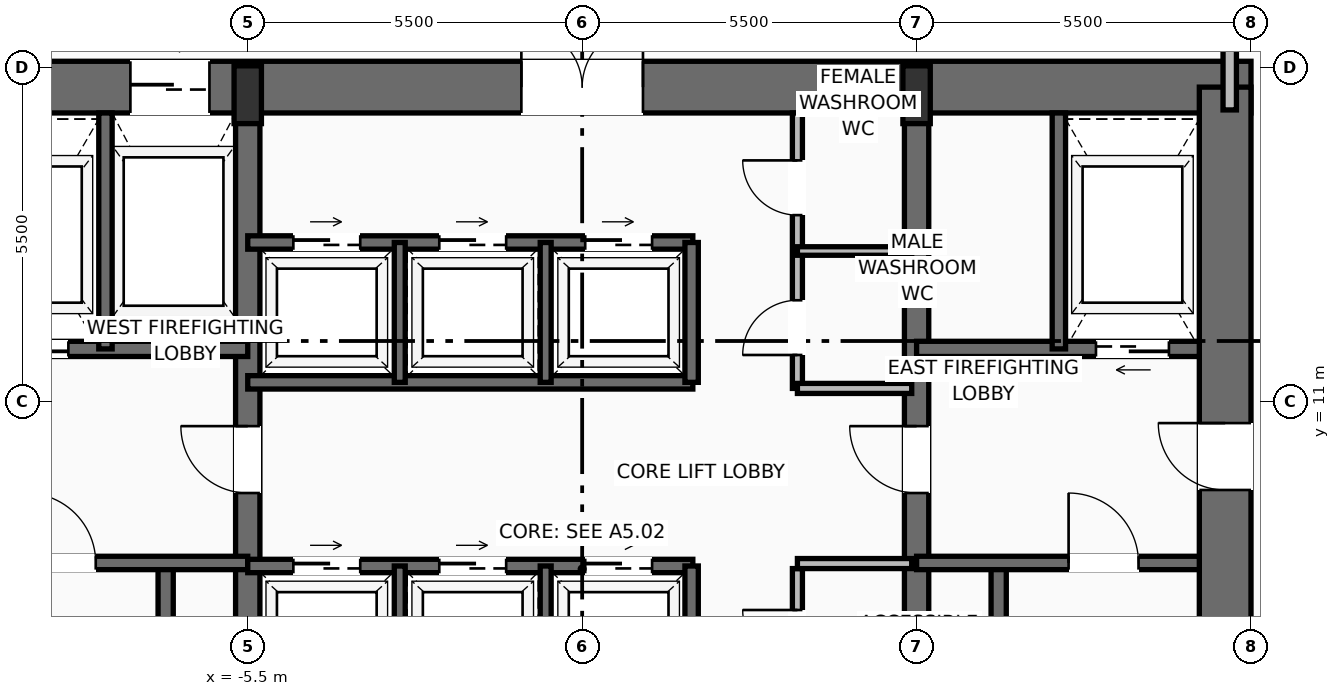
"""IFC4 building model, lengths in metres.
Left out: names, types, materials, properties, quantities, classifications, styles, units other than length and angle.
Written with IfcOpenShell. Run it as: python <this file> out.ifc"""

import sys

from ifc_helpers import new_model, si_unit, direction, frame, frame_2d, origin, origin_2d, place, context, subcontext, project, spatial, rectangle, extrude, source, transform, mapped, element, fill, save


model = new_model("IFC4")
c1 = context("Model", 3, precision=1e-05, world=origin(), true_north=direction((0.0, 1.0)))
c2 = subcontext(c1, "Body", "Model", "MODEL_VIEW")
j1 = project(units=[si_unit("LENGTHUNIT", "METRE"), si_unit("PLANEANGLEUNIT", "RADIAN")], contexts=[c1])
p1 = place(None, origin())
s1 = spatial("IfcSite", under=j1, at=p1, CompositionType="ELEMENT")
p2 = place(p1, origin())
s2 = spatial("IfcBuilding", under=s1, at=p2, CompositionType="ELEMENT")
p3 = place(p2, origin())
s3 = spatial("IfcBuildingStorey", under=s2, at=p3, CompositionType="ELEMENT", Elevation=0.0)
p4 = place(p3, frame((-11.0, 16.175, 0.0), z_axis=(0.0, 0.0, 1.0), x_axis=(1.0, 0.0, 0.0)))
e1 = element("IfcWall", 1, at=p4, inside=s3, PredefinedType="SHEAR", context=c2, shape_type="SweptSolid", body=[
    extrude(rectangle(XDim=22.0, YDim=0.85, at=frame_2d((11.0, 0.0))), origin(), (0.0, 0.0, 1.0), 5.15),
])
p5 = place(p4, frame((3.57, 0.0, 0.0)))
e2 = element("IfcOpeningElement", 2, at=p5, cuts=e1, PredefinedType="OPENING", context=c2, shape_type="SweptSolid", body=[
    extrude(rectangle(XDim=1.3, YDim=2.3, at=frame_2d((0.65, 1.15))), frame((0.0, 0.435, 0.0), z_axis=(0.0, -1.0, 0.0), x_axis=(1.0, 0.0, 0.0)), (0.0, 0.0, 1.0), 0.87),
])
p6 = place(p4, frame((10.0, 0.0, 0.0)))
e3 = element("IfcOpeningElement", 3, at=p6, cuts=e1, PredefinedType="OPENING", context=c2, shape_type="SweptSolid", body=[
    extrude(rectangle(XDim=2.0, YDim=2.4, at=frame_2d((1.0, 1.2))), frame((0.0, 0.435, 0.0), z_axis=(0.0, -1.0, 0.0), x_axis=(1.0, 0.0, 0.0)), (0.0, 0.0, 1.0), 0.87),
])
p7 = place(p3, frame((10.575, 0.425, 0.0), z_axis=(0.0, 0.0, 1.0), x_axis=(0.0, 1.0, 0.0)))
e4 = element("IfcWall", 4, at=p7, inside=s3, PredefinedType="SHEAR", context=c2, shape_type="SweptSolid", body=[
    extrude(rectangle(XDim=15.75, YDim=0.85, at=frame_2d((7.875, 0.0))), origin(), (0.0, 0.0, 1.0), 5.15),
])
p8 = place(p7, frame((9.125, 0.0, 0.0)))
e5 = element("IfcOpeningElement", 5, at=p8, cuts=e4, PredefinedType="OPENING", context=c2, shape_type="SweptSolid", body=[
    extrude(rectangle(XDim=1.1, YDim=2.2, at=frame_2d((0.55, 1.1))), frame((0.0, 0.435, 0.0), z_axis=(0.0, -1.0, 0.0), x_axis=(1.0, 0.0, 0.0)), (0.0, 0.0, 1.0), 0.87),
])
p9 = place(p3, frame((-5.5, 0.425, 0.0), z_axis=(0.0, 0.0, 1.0), x_axis=(0.0, 1.0, 0.0)))
e6 = element("IfcWall", 6, at=p9, inside=s3, PredefinedType="SHEAR", context=c2, shape_type="SweptSolid", body=[
    extrude(rectangle(XDim=15.75, YDim=0.4, at=frame_2d((7.875, 0.0))), origin(), (0.0, 0.0, 1.0), 5.15),
])
p10 = place(p9, frame((9.075, 0.0, 0.0)))
e7 = element("IfcOpeningElement", 7, at=p10, cuts=e6, PredefinedType="OPENING", context=c2, shape_type="SweptSolid", body=[
    extrude(rectangle(XDim=1.1, YDim=2.2, at=frame_2d((0.55, 1.1))), frame((0.0, 0.21, 0.0), z_axis=(0.0, -1.0, 0.0), x_axis=(1.0, 0.0, 0.0)), (0.0, 0.0, 1.0), 0.42),
])
p11 = place(p3, frame((5.5, 0.425, 0.0), z_axis=(0.0, 0.0, 1.0), x_axis=(0.0, 1.0, 0.0)))
e8 = element("IfcWall", 8, at=p11, inside=s3, PredefinedType="SHEAR", context=c2, shape_type="SweptSolid", body=[
    extrude(rectangle(XDim=15.75, YDim=0.4, at=frame_2d((7.875, 0.0))), origin(), (0.0, 0.0, 1.0), 5.15),
])
p12 = place(p11, frame((9.075, 0.0, 0.0)))
e9 = element("IfcOpeningElement", 9, at=p12, cuts=e8, PredefinedType="OPENING", context=c2, shape_type="SweptSolid", body=[
    extrude(rectangle(XDim=1.1, YDim=2.2, at=frame_2d((0.55, 1.1))), frame((0.0, 0.21, 0.0), z_axis=(0.0, -1.0, 0.0), x_axis=(1.0, 0.0, 0.0)), (0.0, 0.0, 1.0), 0.42),
])
m1 = source(origin(), c2, "Body", "SweptSolid", [
    extrude(rectangle(XDim=0.45, YDim=0.95, at=origin_2d()), origin(), (0.0, 0.0, 1.0), 5.5),
])
for number, where, z_axis, x_axis in (
    (10, (-5.5, 16.05, 0.0), (0.0, 0.0, 1.0), (1.0, 0.0, 0.0)),
    (11, (5.5, 16.05, 0.0), (0.0, 0.0, 1.0), (1.0, 0.0, 0.0)),
):
    element("IfcColumn", number, at=place(p3, frame(where, z_axis=z_axis, x_axis=x_axis)), inside=s3, PredefinedType="PILASTER", context=c2, shape_type="MappedRepresentation", body=[
        mapped(m1, transform((0.0, 0.0, 0.0), scale=1.0)),
    ])
p13 = place(p3, frame((-6.85, 0.85, 0.0), z_axis=(0.0, 0.0, 1.0), x_axis=(0.0, 1.0, 0.0)))
e12 = element("IfcWall", 12, at=p13, inside=s3, PredefinedType="SOLIDWALL", context=c2, shape_type="SweptSolid", body=[
    extrude(rectangle(XDim=7.5, YDim=0.25, at=frame_2d((3.75, 0.0))), origin(), (0.0, 0.0, 1.0), 5.15),
])
p14 = place(p3, frame((-10.15, 8.35, 0.0), z_axis=(0.0, 0.0, 1.0), x_axis=(1.0, 0.0, 0.0)))
e13 = element("IfcWall", 13, at=p14, inside=s3, PredefinedType="SOLIDWALL", context=c2, shape_type="SweptSolid", body=[
    extrude(rectangle(XDim=4.65, YDim=0.22, at=frame_2d((2.325, 0.0))), origin(), (0.0, 0.0, 1.0), 5.15),
])
p15 = place(p14, frame((1.0, 0.0, 0.0)))
e14 = element("IfcOpeningElement", 14, at=p15, cuts=e13, PredefinedType="OPENING", context=c2, shape_type="SweptSolid", body=[
    extrude(rectangle(XDim=1.15, YDim=2.2, at=frame_2d((0.575, 1.1))), frame((0.0, 0.12, 0.0), z_axis=(0.0, -1.0, 0.0), x_axis=(1.0, 0.0, 0.0)), (0.0, 0.0, 1.0), 0.24),
])
p16 = place(p3, frame((-5.5, 11.87, 0.0), z_axis=(0.0, 0.0, 1.0), x_axis=(-1.0, 0.0, 0.0)))
e15 = element("IfcWall", 15, at=p16, inside=s3, PredefinedType="SOLIDWALL", context=c2, shape_type="SweptSolid", body=[
    extrude(rectangle(XDim=4.65, YDim=0.25, at=frame_2d((2.325, 0.0))), origin(), (0.0, 0.0, 1.0), 5.15),
])
p17 = place(p16, frame((2.95, 0.0, 0.0)))
e16 = element("IfcOpeningElement", 16, at=p17, cuts=e15, PredefinedType="OPENING", context=c2, shape_type="SweptSolid", body=[
    extrude(rectangle(XDim=1.2, YDim=2.25, at=frame_2d((0.6, 1.125))), frame((0.0, 0.135, 0.0), z_axis=(0.0, -1.0, 0.0), x_axis=(1.0, 0.0, 0.0)), (0.0, 0.0, 1.0), 0.27),
])
p18 = place(p3, frame((-7.84, 11.87, 0.0), z_axis=(0.0, 0.0, 1.0), x_axis=(0.0, 1.0, 0.0)))
e17 = element("IfcWall", 17, at=p18, inside=s3, PredefinedType="SOLIDWALL", context=c2, shape_type="SweptSolid", body=[
    extrude(rectangle(XDim=3.88, YDim=0.22, at=frame_2d((1.94, 0.0))), origin(), (0.0, 0.0, 1.0), 5.15),
])
p19 = place(p3, frame((6.85, 0.85, 0.0), z_axis=(0.0, 0.0, 1.0), x_axis=(0.0, 1.0, 0.0)))
e18 = element("IfcWall", 18, at=p19, inside=s3, PredefinedType="SOLIDWALL", context=c2, shape_type="SweptSolid", body=[
    extrude(rectangle(XDim=7.5, YDim=0.25, at=frame_2d((3.75, 0.0))), origin(), (0.0, 0.0, 1.0), 5.15),
])
p20 = place(p3, frame((5.5, 8.35, 0.0), z_axis=(0.0, 0.0, 1.0), x_axis=(1.0, 0.0, 0.0)))
e19 = element("IfcWall", 19, at=p20, inside=s3, PredefinedType="SOLIDWALL", context=c2, shape_type="SweptSolid", body=[
    extrude(rectangle(XDim=4.65, YDim=0.22, at=frame_2d((2.325, 0.0))), origin(), (0.0, 0.0, 1.0), 5.15),
])
p21 = place(p20, frame((2.5, 0.0, 0.0)))
e20 = element("IfcOpeningElement", 20, at=p21, cuts=e19, PredefinedType="OPENING", context=c2, shape_type="SweptSolid", body=[
    extrude(rectangle(XDim=1.15, YDim=2.2, at=frame_2d((0.575, 1.1))), frame((0.0, 0.12, 0.0), z_axis=(0.0, -1.0, 0.0), x_axis=(1.0, 0.0, 0.0)), (0.0, 0.0, 1.0), 0.24),
])
p22 = place(p3, frame((10.15, 11.87, 0.0), z_axis=(0.0, 0.0, 1.0), x_axis=(-1.0, 0.0, 0.0)))
e21 = element("IfcWall", 21, at=p22, inside=s3, PredefinedType="SOLIDWALL", context=c2, shape_type="SweptSolid", body=[
    extrude(rectangle(XDim=4.65, YDim=0.25, at=frame_2d((2.325, 0.0))), origin(), (0.0, 0.0, 1.0), 5.15),
])
p23 = place(p22, frame((0.5, 0.0, 0.0)))
e22 = element("IfcOpeningElement", 22, at=p23, cuts=e21, PredefinedType="OPENING", context=c2, shape_type="SweptSolid", body=[
    extrude(rectangle(XDim=1.2, YDim=2.25, at=frame_2d((0.6, 1.125))), frame((0.0, 0.135, 0.0), z_axis=(0.0, -1.0, 0.0), x_axis=(1.0, 0.0, 0.0)), (0.0, 0.0, 1.0), 0.27),
])
p24 = place(p3, frame((7.84, 11.87, 0.0), z_axis=(0.0, 0.0, 1.0), x_axis=(0.0, 1.0, 0.0)))
e23 = element("IfcWall", 23, at=p24, inside=s3, PredefinedType="SOLIDWALL", context=c2, shape_type="SweptSolid", body=[
    extrude(rectangle(XDim=3.88, YDim=0.22, at=frame_2d((1.94, 0.0))), origin(), (0.0, 0.0, 1.0), 5.15),
])
p25 = place(p3, frame((3.54, 5.383, 0.0), z_axis=(0.0, 0.0, 1.0), x_axis=(0.0, 1.0, 0.0)))
e24 = element("IfcWall", 24, at=p25, inside=s3, PredefinedType="PARTITIONING", context=c2, shape_type="SweptSolid", body=[
    extrude(rectangle(XDim=2.875, YDim=0.165, at=frame_2d((1.438, 0.0))), origin(), (0.0, 0.0, 1.0), 5.142),
])
p26 = place(p25, frame((1.294, 0.0, 0.0)))
e25 = element("IfcOpeningElement", 25, at=p26, cuts=e24, PredefinedType="OPENING", context=c2, shape_type="SweptSolid", body=[
    extrude(rectangle(XDim=0.9, YDim=2.1, at=frame_2d((0.45, 1.05))), frame((0.0, 0.093, 0.0), z_axis=(0.0, -1.0, 0.0), x_axis=(1.0, 0.0, 0.0)), (0.0, 0.0, 1.0), 0.185),
])
p27 = place(p3, frame((3.54, 8.34, 0.0), z_axis=(0.0, 0.0, 1.0), x_axis=(1.0, 0.0, 0.0)))
e26 = element("IfcWall", 26, at=p27, inside=s3, PredefinedType="PARTITIONING", context=c2, shape_type="SweptSolid", body=[
    extrude(rectangle(XDim=1.88, YDim=0.165, at=frame_2d((0.94, 0.0))), origin(), (0.0, 0.0, 1.0), 5.142),
])
p28 = place(p3, frame((-5.5, 8.3, 0.0), z_axis=(0.0, 0.0, 1.0), x_axis=(1.0, 0.0, 0.0)))
e27 = element("IfcWall", 27, at=p28, inside=s3, PredefinedType="SOLIDWALL", context=c2, shape_type="SweptSolid", body=[
    extrude(rectangle(XDim=7.32, YDim=0.22, at=frame_2d((3.66, 0.0))), origin(), (0.0, 0.0, 1.0), 5.15),
])
p29 = place(p28, frame((0.75, 0.0, 0.0)))
e28 = element("IfcOpeningElement", 28, at=p29, cuts=e27, PredefinedType="OPENING", context=c2, shape_type="SweptSolid", body=[
    extrude(rectangle(XDim=1.1, YDim=2.2, at=frame_2d((0.55, 1.1))), frame((0.0, 0.12, 0.0), z_axis=(0.0, -1.0, 0.0), x_axis=(1.0, 0.0, 0.0)), (0.0, 0.0, 1.0), 0.24),
])
p30 = place(p28, frame((3.15, 0.0, 0.0)))
e29 = element("IfcOpeningElement", 29, at=p30, cuts=e27, PredefinedType="OPENING", context=c2, shape_type="SweptSolid", body=[
    extrude(rectangle(XDim=1.1, YDim=2.2, at=frame_2d((0.55, 1.1))), frame((0.0, 0.12, 0.0), z_axis=(0.0, -1.0, 0.0), x_axis=(1.0, 0.0, 0.0)), (0.0, 0.0, 1.0), 0.24),
])
p31 = place(p28, frame((5.55, 0.0, 0.0)))
e30 = element("IfcOpeningElement", 30, at=p31, cuts=e27, PredefinedType="OPENING", context=c2, shape_type="SweptSolid", body=[
    extrude(rectangle(XDim=1.1, YDim=2.2, at=frame_2d((0.55, 1.1))), frame((0.0, 0.12, 0.0), z_axis=(0.0, -1.0, 0.0), x_axis=(1.0, 0.0, 0.0)), (0.0, 0.0, 1.0), 0.24),
])
p32 = place(p3, frame((1.8, 6.0, 0.0), z_axis=(0.0, 0.0, 1.0), x_axis=(0.0, 1.0, 0.0)))
e31 = element("IfcWall", 31, at=p32, inside=s3, PredefinedType="SOLIDWALL", context=c2, shape_type="SweptSolid", body=[
    extrude(rectangle(XDim=2.3, YDim=0.22, at=frame_2d((1.15, 0.0))), origin(), (0.0, 0.0, 1.0), 5.15),
])
for number, where, z_axis, x_axis in (
    (32, (-3.0, 6.0, 0.0), (0.0, 0.0, 1.0), (0.0, 1.0, 0.0)),
    (33, (-0.6, 6.0, 0.0), (0.0, 0.0, 1.0), (0.0, 1.0, 0.0)),
):
    element("IfcWall", number, at=place(p3, frame(where, z_axis=z_axis, x_axis=x_axis)), inside=s3, PredefinedType="SOLIDWALL", context=c2, shape_type="SweptSolid", body=[
        extrude(rectangle(XDim=2.3, YDim=0.18, at=frame_2d((1.15, 0.0))), origin(), (0.0, 0.0, 1.0), 5.15),
    ])
p33 = place(p3, frame((-5.5, 11.32, 0.0), z_axis=(0.0, 0.0, 1.0), x_axis=(1.0, 0.0, 0.0)))
e34 = element("IfcWall", 34, at=p33, inside=s3, PredefinedType="SOLIDWALL", context=c2, shape_type="SweptSolid", body=[
    extrude(rectangle(XDim=7.32, YDim=0.22, at=frame_2d((3.66, 0.0))), origin(), (0.0, 0.0, 1.0), 5.15),
])
p34 = place(p3, frame((-5.5, 13.62, 0.0), z_axis=(0.0, 0.0, 1.0), x_axis=(1.0, 0.0, 0.0)))
e35 = element("IfcWall", 35, at=p34, inside=s3, PredefinedType="SOLIDWALL", context=c2, shape_type="SweptSolid", body=[
    extrude(rectangle(XDim=7.32, YDim=0.22, at=frame_2d((3.66, 0.0))), origin(), (0.0, 0.0, 1.0), 5.15),
])
p35 = place(p34, frame((0.75, 0.0, 0.0)))
e36 = element("IfcOpeningElement", 36, at=p35, cuts=e35, PredefinedType="OPENING", context=c2, shape_type="SweptSolid", body=[
    extrude(rectangle(XDim=1.1, YDim=2.2, at=frame_2d((0.55, 1.1))), frame((0.0, 0.12, 0.0), z_axis=(0.0, -1.0, 0.0), x_axis=(1.0, 0.0, 0.0)), (0.0, 0.0, 1.0), 0.24),
])
p36 = place(p34, frame((3.15, 0.0, 0.0)))
e37 = element("IfcOpeningElement", 37, at=p36, cuts=e35, PredefinedType="OPENING", context=c2, shape_type="SweptSolid", body=[
    extrude(rectangle(XDim=1.1, YDim=2.2, at=frame_2d((0.55, 1.1))), frame((0.0, 0.12, 0.0), z_axis=(0.0, -1.0, 0.0), x_axis=(1.0, 0.0, 0.0)), (0.0, 0.0, 1.0), 0.24),
])
p37 = place(p34, frame((5.55, 0.0, 0.0)))
e38 = element("IfcOpeningElement", 38, at=p37, cuts=e35, PredefinedType="OPENING", context=c2, shape_type="SweptSolid", body=[
    extrude(rectangle(XDim=1.1, YDim=2.2, at=frame_2d((0.55, 1.1))), frame((0.0, 0.12, 0.0), z_axis=(0.0, -1.0, 0.0), x_axis=(1.0, 0.0, 0.0)), (0.0, 0.0, 1.0), 0.24),
])
p38 = place(p3, frame((1.8, 11.32, 0.0), z_axis=(0.0, 0.0, 1.0), x_axis=(0.0, 1.0, 0.0)))
e39 = element("IfcWall", 39, at=p38, inside=s3, PredefinedType="SOLIDWALL", context=c2, shape_type="SweptSolid", body=[
    extrude(rectangle(XDim=2.3, YDim=0.22, at=frame_2d((1.15, 0.0))), origin(), (0.0, 0.0, 1.0), 5.15),
])
for number, where, z_axis, x_axis in (
    (40, (-3.0, 11.32, 0.0), (0.0, 0.0, 1.0), (0.0, 1.0, 0.0)),
    (41, (-0.6, 11.32, 0.0), (0.0, 0.0, 1.0), (0.0, 1.0, 0.0)),
):
    element("IfcWall", number, at=place(p3, frame(where, z_axis=z_axis, x_axis=x_axis)), inside=s3, PredefinedType="SOLIDWALL", context=c2, shape_type="SweptSolid", body=[
        extrude(rectangle(XDim=2.3, YDim=0.18, at=frame_2d((1.15, 0.0))), origin(), (0.0, 0.0, 1.0), 5.15),
    ])
p39 = place(p3, frame((3.54, 11.22, 0.0), z_axis=(0.0, 0.0, 1.0), x_axis=(0.0, 1.0, 0.0)))
e42 = element("IfcWall", 42, at=p39, inside=s3, PredefinedType="PARTITIONING", context=c2, shape_type="SweptSolid", body=[
    extrude(rectangle(XDim=4.53, YDim=0.165, at=frame_2d((2.265, 0.0))), origin(), (0.0, 0.0, 1.0), 5.142),
])
p40 = place(p39, frame((0.55, 0.0, 0.0)))
e43 = element("IfcOpeningElement", 43, at=p40, cuts=e42, PredefinedType="OPENING", context=c2, shape_type="SweptSolid", body=[
    extrude(rectangle(XDim=0.9, YDim=2.1, at=frame_2d((0.45, 1.05))), frame((0.0, 0.093, 0.0), z_axis=(0.0, -1.0, 0.0), x_axis=(1.0, 0.0, 0.0)), (0.0, 0.0, 1.0), 0.185),
])
p41 = place(p39, frame((2.85, 0.0, 0.0)))
e44 = element("IfcOpeningElement", 44, at=p41, cuts=e42, PredefinedType="OPENING", context=c2, shape_type="SweptSolid", body=[
    extrude(rectangle(XDim=0.9, YDim=2.1, at=frame_2d((0.45, 1.05))), frame((0.0, 0.093, 0.0), z_axis=(0.0, -1.0, 0.0), x_axis=(1.0, 0.0, 0.0)), (0.0, 0.0, 1.0), 0.185),
])
p42 = place(p3, frame((3.54, 11.22, 0.0), z_axis=(0.0, 0.0, 1.0), x_axis=(1.0, 0.0, 0.0)))
e45 = element("IfcWall", 45, at=p42, inside=s3, PredefinedType="PARTITIONING", context=c2, shape_type="SweptSolid", body=[
    extrude(rectangle(XDim=1.88, YDim=0.165, at=frame_2d((0.94, 0.0))), origin(), (0.0, 0.0, 1.0), 5.142),
])
p43 = place(p3, frame((3.54, 13.48, 0.0), z_axis=(0.0, 0.0, 1.0), x_axis=(1.0, 0.0, 0.0)))
e46 = element("IfcWall", 46, at=p43, inside=s3, PredefinedType="PARTITIONING", context=c2, shape_type="SweptSolid", body=[
    extrude(rectangle(XDim=1.88, YDim=0.14, at=frame_2d((0.94, 0.0))), origin(), (0.0, 0.0, 1.0), 5.142),
])
p44 = place(p3, frame((10.65, 15.8, 0.0), z_axis=(0.0, 0.0, 1.0), x_axis=(0.0, 1.0, 0.0)))
e47 = element("IfcWall", 47, at=p44, inside=s3, PredefinedType="SOLIDWALL", context=c2, shape_type="SweptSolid", body=[
    extrude(rectangle(XDim=1.85, YDim=0.22, at=frame_2d((0.925, 0.0))), origin(), (0.0, 0.0, 1.0), 4.102),
])
m2 = source(origin(), c2, "Body", "SweptSolid", [
    extrude(rectangle(XDim=1.15, YDim=2.2, at=frame_2d((0.575, 1.1))), frame((0.0, 0.025, 0.0), z_axis=(0.0, -1.0, 0.0), x_axis=(1.0, 0.0, 0.0)), (0.0, 0.0, 1.0), 0.05),
])
p45 = place(p15, origin())
e48 = element("IfcDoor", 48, at=p45, inside=s3, OperationType="SINGLE_SWING_LEFT", PredefinedType="DOOR", context=c2, shape_type="MappedRepresentation", body=[
    mapped(m2, transform((0.0, 0.0, 0.0), scale=1.0)),
])
fill(e14, e48)
m3 = source(origin(), c2, "Body", "SweptSolid", [
    extrude(rectangle(XDim=1.1, YDim=2.2, at=frame_2d((0.55, 1.1))), frame((0.0, 0.025, 0.0), z_axis=(0.0, -1.0, 0.0), x_axis=(1.0, 0.0, 0.0)), (0.0, 0.0, 1.0), 0.05),
])
p46 = place(p10, origin())
e49 = element("IfcDoor", 49, at=p46, inside=s3, OperationType="SINGLE_SWING_RIGHT", PredefinedType="DOOR", context=c2, shape_type="MappedRepresentation", body=[
    mapped(m3, transform((0.0, 0.0, 0.0), scale=1.0)),
])
fill(e7, e49)
m4 = source(origin(), c2, "Body", "SweptSolid", [
    extrude(rectangle(XDim=1.2, YDim=2.25, at=frame_2d((0.6, 1.125))), frame((0.0, 0.025, 0.0), z_axis=(0.0, -1.0, 0.0), x_axis=(1.0, 0.0, 0.0)), (0.0, 0.0, 1.0), 0.05),
])
p47 = place(p17, origin())
e50 = element("IfcDoor", 50, at=p47, inside=s3, OperationType="SLIDING_TO_LEFT", PredefinedType="DOOR", context=c2, shape_type="MappedRepresentation", body=[
    mapped(m4, transform((0.0, 0.0, 0.0), scale=1.0)),
])
fill(e16, e50)
m5 = source(origin(), c2, "Body", "SweptSolid", [
    extrude(rectangle(XDim=1.3, YDim=2.3, at=frame_2d((0.65, 1.15))), frame((0.0, 0.025, 0.0), z_axis=(0.0, -1.0, 0.0), x_axis=(1.0, 0.0, 0.0)), (0.0, 0.0, 1.0), 0.05),
])
p48 = place(p5, origin())
e51 = element("IfcDoor", 51, at=p48, inside=s3, OperationType="SLIDING_TO_RIGHT", PredefinedType="DOOR", context=c2, shape_type="MappedRepresentation", body=[
    mapped(m5, transform((0.0, 0.0, 0.0), scale=1.0)),
])
fill(e2, e51)
p49 = place(p21, origin())
e52 = element("IfcDoor", 52, at=p49, inside=s3, OperationType="SINGLE_SWING_LEFT", PredefinedType="DOOR", context=c2, shape_type="MappedRepresentation", body=[
    mapped(m2, transform((0.0, 0.0, 0.0), scale=1.0)),
])
fill(e20, e52)
p50 = place(p12, origin())
e53 = element("IfcDoor", 53, at=p50, inside=s3, OperationType="SINGLE_SWING_RIGHT", PredefinedType="DOOR", context=c2, shape_type="MappedRepresentation", body=[
    mapped(m3, transform((0.0, 0.0, 0.0), scale=1.0)),
])
fill(e9, e53)
p51 = place(p8, origin())
e54 = element("IfcDoor", 54, at=p51, inside=s3, OperationType="SINGLE_SWING_RIGHT", PredefinedType="DOOR", context=c2, shape_type="MappedRepresentation", body=[
    mapped(m3, transform((0.0, 0.0, 0.0), scale=1.0)),
])
fill(e5, e54)
p52 = place(p23, origin())
e55 = element("IfcDoor", 55, at=p52, inside=s3, OperationType="SLIDING_TO_RIGHT", PredefinedType="DOOR", context=c2, shape_type="MappedRepresentation", body=[
    mapped(m4, transform((0.0, 0.0, 0.0), scale=1.0)),
])
fill(e22, e55)
m6 = source(origin(), c2, "Body", "SweptSolid", [
    extrude(rectangle(XDim=2.0, YDim=2.4, at=frame_2d((1.0, 1.2))), frame((0.0, 0.025, 0.0), z_axis=(0.0, -1.0, 0.0), x_axis=(1.0, 0.0, 0.0)), (0.0, 0.0, 1.0), 0.05),
])
p53 = place(p6, origin())
e56 = element("IfcDoor", 56, at=p53, inside=s3, OperationType="DOUBLE_DOOR_SINGLE_SWING", PredefinedType="DOOR", context=c2, shape_type="MappedRepresentation", body=[
    mapped(m6, transform((0.0, 0.0, 0.0), scale=1.0)),
])
fill(e3, e56)
m7 = source(origin(), c2, "Body", "SweptSolid", [
    extrude(rectangle(XDim=0.9, YDim=2.1, at=frame_2d((0.45, 1.05))), frame((0.0, 0.025, 0.0), z_axis=(0.0, -1.0, 0.0), x_axis=(1.0, 0.0, 0.0)), (0.0, 0.0, 1.0), 0.05),
])
p54 = place(p26, origin())
e57 = element("IfcDoor", 57, at=p54, inside=s3, OperationType="SINGLE_SWING_RIGHT", PredefinedType="DOOR", context=c2, shape_type="MappedRepresentation", body=[
    mapped(m7, transform((0.0, 0.0, 0.0), scale=1.0)),
])
fill(e25, e57)
m8 = source(origin(), c2, "Body", "SweptSolid", [
    extrude(rectangle(XDim=1.1, YDim=2.2, at=frame_2d((0.55, 1.1))), frame((0.0, 0.025, 0.0), z_axis=(0.0, -1.0, 0.0), x_axis=(1.0, 0.0, 0.0)), (0.0, 0.0, 1.0), 0.05),
])
p55 = place(p29, origin())
e58 = element("IfcDoor", 58, at=p55, inside=s3, OperationType="SLIDING_TO_LEFT", PredefinedType="DOOR", context=c2, shape_type="MappedRepresentation", body=[
    mapped(m8, transform((0.0, 0.0, 0.0), scale=1.0)),
])
fill(e28, e58)
p56 = place(p30, origin())
e59 = element("IfcDoor", 59, at=p56, inside=s3, OperationType="SLIDING_TO_LEFT", PredefinedType="DOOR", context=c2, shape_type="MappedRepresentation", body=[
    mapped(m8, transform((0.0, 0.0, 0.0), scale=1.0)),
])
fill(e29, e59)
p57 = place(p31, origin())
e60 = element("IfcDoor", 60, at=p57, inside=s3, OperationType="SLIDING_TO_LEFT", PredefinedType="DOOR", context=c2, shape_type="MappedRepresentation", body=[
    mapped(m8, transform((0.0, 0.0, 0.0), scale=1.0)),
])
fill(e30, e60)
p58 = place(p35, origin())
e61 = element("IfcDoor", 61, at=p58, inside=s3, OperationType="SLIDING_TO_RIGHT", PredefinedType="DOOR", context=c2, shape_type="MappedRepresentation", body=[
    mapped(m8, transform((0.0, 0.0, 0.0), scale=1.0)),
])
fill(e36, e61)
p59 = place(p36, origin())
e62 = element("IfcDoor", 62, at=p59, inside=s3, OperationType="SLIDING_TO_RIGHT", PredefinedType="DOOR", context=c2, shape_type="MappedRepresentation", body=[
    mapped(m8, transform((0.0, 0.0, 0.0), scale=1.0)),
])
fill(e37, e62)
p60 = place(p37, origin())
e63 = element("IfcDoor", 63, at=p60, inside=s3, OperationType="SLIDING_TO_RIGHT", PredefinedType="DOOR", context=c2, shape_type="MappedRepresentation", body=[
    mapped(m8, transform((0.0, 0.0, 0.0), scale=1.0)),
])
fill(e38, e63)
p61 = place(p40, origin())
e64 = element("IfcDoor", 64, at=p61, inside=s3, OperationType="SINGLE_SWING_LEFT", PredefinedType="DOOR", context=c2, shape_type="MappedRepresentation", body=[
    mapped(m7, transform((0.0, 0.0, 0.0), scale=1.0)),
])
fill(e43, e64)
p62 = place(p41, origin())
e65 = element("IfcDoor", 65, at=p62, inside=s3, OperationType="SINGLE_SWING_RIGHT", PredefinedType="DOOR", context=c2, shape_type="MappedRepresentation", body=[
    mapped(m7, transform((0.0, 0.0, 0.0), scale=1.0)),
])
fill(e44, e65)
save(model, sys.argv[1])
